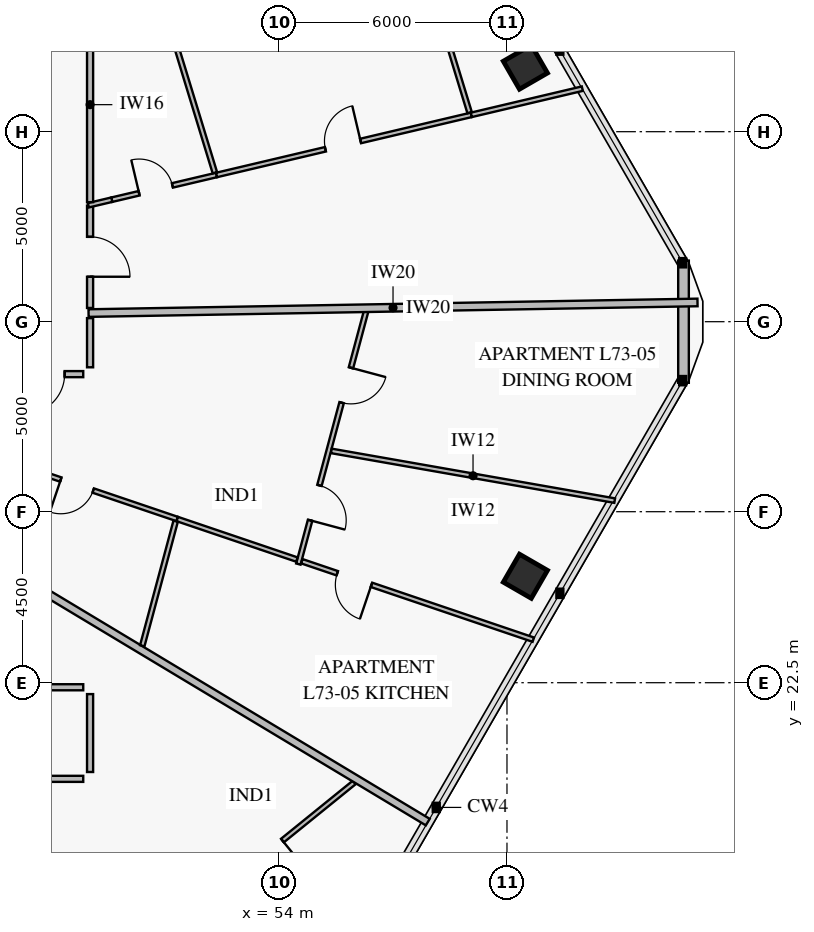
"""IFC4 building model, lengths in metres.
Left out: names, types, materials, properties, quantities, classifications, styles, units other than length and angle.
Written with IfcOpenShell. Run it as: python <this file> out.ifc"""

import sys

from ifc_helpers import new_model, si_unit, direction, frame, frame_2d, origin, origin_2d, place, context, subcontext, project, spatial, rectangle, extrude, element, fill, save


model = new_model("IFC4")
c1 = context("Model", 3, precision=1e-05, world=origin(), true_north=direction((0.0, 1.0)))
c2 = subcontext(c1, "Body", "Model", "MODEL_VIEW")
j1 = project(units=[si_unit("LENGTHUNIT", "METRE"), si_unit("PLANEANGLEUNIT", "RADIAN")], contexts=[c1])
p1 = place(None, origin())
s1 = spatial("IfcSite", under=j1, at=p1, CompositionType="ELEMENT")
p2 = place(p1, origin())
s2 = spatial("IfcBuilding", under=s1, at=p2, CompositionType="ELEMENT")
p3 = place(p2, frame((0.0, 0.0, 288.2)))
s3 = spatial("IfcBuildingStorey", under=s2, at=p3, CompositionType="ELEMENT", Elevation=288.2)
for number, where, z_axis, x_axis in (
    (1, (60.485, 38.699, 0.0), (0.0, 0.0, 1.0), (-0.5, 0.866, 0.0)),
    (2, (60.485, 25.301, 0.0), (0.0, 0.0, 1.0), (0.5, 0.866, 0.0)),
):
    element("IfcColumn", number, at=place(p3, frame(where, z_axis=z_axis, x_axis=x_axis)), inside=s3, PredefinedType="COLUMN", context=c2, shape_type="SweptSolid", body=[
        extrude(rectangle(XDim=0.85, YDim=0.85, at=origin_2d()), origin(), (0.0, 0.0, 1.0), 3.55),
    ])
p4 = place(p3, frame((64.645, 33.607, 0.0), z_axis=(0.0, 0.0, 1.0), x_axis=(0.0, -1.0, 0.0)))
e3 = element("IfcWall", 3, at=p4, inside=s3, PredefinedType="SOLIDWALL", context=c2, shape_type="SweptSolid", body=[
    extrude(rectangle(XDim=3.215, YDim=0.28, at=frame_2d((1.607, 0.0))), origin(), (0.0, 0.0, 1.0), 3.55),
])
p5 = place(p3, frame((47.542, 13.042, 0.0), z_axis=(0.0, 0.0, 1.0), x_axis=(0.777147459209, 0.629318541476, 0.0)))
e4 = element("IfcWall", 4, at=p5, inside=s3, PredefinedType="PARTITIONING", context=c2, shape_type="SweptSolid", body=[
    extrude(rectangle(XDim=10.857, YDim=0.12, at=frame_2d((5.428, 0.0))), origin(), (0.0, 0.0, 1.0), 2.95),
])
p6 = place(p5, frame((2.291, 0.0, 0.0)))
e5 = element("IfcOpeningElement", 5, at=p6, cuts=e4, PredefinedType="OPENING", context=c2, shape_type="SweptSolid", body=[
    extrude(rectangle(XDim=0.95, YDim=2.1, at=frame_2d((0.475, 1.05))), frame((0.0, 0.072, 0.0), z_axis=(0.0, -1.0, 0.0), x_axis=(1.0, 0.0, 0.0)), (0.0, 0.0, 1.0), 0.144),
])
p7 = place(p5, frame((7.479, 0.0, 0.0)))
e6 = element("IfcOpeningElement", 6, at=p7, cuts=e4, PredefinedType="OPENING", context=c2, shape_type="SweptSolid", body=[
    extrude(rectangle(XDim=0.95, YDim=2.1, at=frame_2d((0.475, 1.05))), frame((0.0, 0.072, 0.0), z_axis=(0.0, -1.0, 0.0), x_axis=(1.0, 0.0, 0.0)), (0.0, 0.0, 1.0), 0.144),
])
p8 = place(p3, frame((43.421, 19.97, 0.0), z_axis=(0.0, 0.0, 1.0), x_axis=(1.0, 0.0, 0.0)))
e7 = element("IfcWall", 7, at=p8, inside=s3, PredefinedType="PARTITIONING", context=c2, shape_type="SweptSolid", body=[
    extrude(rectangle(XDim=5.429, YDim=0.16, at=frame_2d((2.714, 0.0))), origin(), (0.0, 0.0, 1.0), 2.95),
])
p9 = place(p8, frame((2.189, 0.0, 0.0)))
e8 = element("IfcOpeningElement", 8, at=p9, cuts=e7, PredefinedType="OPENING", context=c2, shape_type="SweptSolid", body=[
    extrude(rectangle(XDim=1.05, YDim=2.15, at=frame_2d((0.525, 1.075))), frame((0.0, 0.092, 0.0), z_axis=(0.0, -1.0, 0.0), x_axis=(1.0, 0.0, 0.0)), (0.0, 0.0, 1.0), 0.184),
])
p10 = place(p3, frame((54.51, 25.622, 0.0), z_axis=(0.0, 0.0, 1.0), x_axis=(0.258833493947, 0.965921954617, 0.0)))
e9 = element("IfcWall", 9, at=p10, inside=s3, PredefinedType="PARTITIONING", context=c2, shape_type="SweptSolid", body=[
    extrude(rectangle(XDim=6.89, YDim=0.12, at=frame_2d((3.445, 0.0))), origin(), (0.0, 0.0, 1.0), 2.95),
])
p11 = place(p10, frame((1.193, 0.0, 0.0)))
e10 = element("IfcOpeningElement", 10, at=p11, cuts=e9, PredefinedType="OPENING", context=c2, shape_type="SweptSolid", body=[
    extrude(rectangle(XDim=0.95, YDim=2.1, at=frame_2d((0.475, 1.05))), frame((0.0, 0.072, 0.0), z_axis=(0.0, -1.0, 0.0), x_axis=(1.0, 0.0, 0.0)), (0.0, 0.0, 1.0), 0.144),
])
p12 = place(p10, frame((4.398, 0.0, 0.0)))
e11 = element("IfcOpeningElement", 11, at=p12, cuts=e9, PredefinedType="OPENING", context=c2, shape_type="SweptSolid", body=[
    extrude(rectangle(XDim=0.95, YDim=2.1, at=frame_2d((0.475, 1.05))), frame((0.0, 0.072, 0.0), z_axis=(0.0, -1.0, 0.0), x_axis=(1.0, 0.0, 0.0)), (0.0, 0.0, 1.0), 0.144),
])
p13 = place(p3, frame((46.808, 28.337, 0.0), z_axis=(0.0, 0.0, 1.0), x_axis=(0.947109682019, -0.320910034474, 0.0)))
e12 = element("IfcWall", 12, at=p13, inside=s3, PredefinedType="PARTITIONING", context=c2, shape_type="SweptSolid", body=[
    extrude(rectangle(XDim=4.767, YDim=0.12, at=frame_2d((2.384, 0.0))), origin(), (0.0, 0.0, 1.0), 3.55),
])
p14 = place(p13, frame((1.533, 0.0, 0.0)))
e13 = element("IfcOpeningElement", 13, at=p14, cuts=e12, PredefinedType="OPENING", context=c2, shape_type="SweptSolid", body=[
    extrude(rectangle(XDim=0.9, YDim=2.1, at=frame_2d((0.45, 1.05))), frame((0.0, 0.072, 0.0), z_axis=(0.0, -1.0, 0.0), x_axis=(1.0, 0.0, 0.0)), (0.0, 0.0, 1.0), 0.144),
])
p15 = place(p3, frame((51.323, 26.808, 0.0), z_axis=(0.0, 0.0, 1.0), x_axis=(0.947092742831, -0.320960023175, 0.0)))
e14 = element("IfcWall", 14, at=p15, inside=s3, PredefinedType="PARTITIONING", context=c2, shape_type="SweptSolid", body=[
    extrude(rectangle(XDim=3.325, YDim=0.12, at=frame_2d((1.663, 0.0))), origin(), (0.0, 0.0, 1.0), 3.15),
])
p16 = place(p3, frame((54.601, 25.697, 0.0), z_axis=(0.0, 0.0, 1.0), x_axis=(0.947084656941, -0.320983882128, 0.0)))
e15 = element("IfcWall", 15, at=p16, inside=s3, PredefinedType="PARTITIONING", context=c2, shape_type="SweptSolid", body=[
    extrude(rectangle(XDim=6.432, YDim=0.12, at=frame_2d((3.216, 0.0))), origin(), (0.0, 0.0, 1.0), 2.93),
])
p17 = place(p16, frame((0.985, 0.0, 0.0)))
e16 = element("IfcOpeningElement", 16, at=p17, cuts=e15, PredefinedType="OPENING", context=c2, shape_type="SweptSolid", body=[
    extrude(rectangle(XDim=0.95, YDim=2.1, at=frame_2d((0.475, 1.05))), frame((0.0, 0.072, 0.0), z_axis=(0.0, -1.0, 0.0), x_axis=(1.0, 0.0, 0.0)), (0.0, 0.0, 1.0), 0.144),
])
p18 = place(p3, frame((46.82, 30.62, 0.0), z_axis=(0.0, 0.0, 1.0), x_axis=(1.0, 0.0, 0.0)))
e17 = element("IfcWall", 17, at=p18, inside=s3, PredefinedType="PARTITIONING", context=c2, shape_type="SweptSolid", body=[
    extrude(rectangle(XDim=2.03, YDim=0.16, at=frame_2d((1.015, 0.0))), origin(), (0.0, 0.0, 1.0), 3.55),
])
p19 = place(p18, frame((0.49, 0.0, 0.0)))
e18 = element("IfcOpeningElement", 18, at=p19, cuts=e17, PredefinedType="OPENING", context=c2, shape_type="SweptSolid", body=[
    extrude(rectangle(XDim=1.05, YDim=2.15, at=frame_2d((0.525, 1.075))), frame((0.0, 0.092, 0.0), z_axis=(0.0, -1.0, 0.0), x_axis=(1.0, 0.0, 0.0)), (0.0, 0.0, 1.0), 0.184),
])
p20 = place(p3, frame((49.6, 35.21, 0.0), z_axis=(0.0, 0.0, 1.0), x_axis=(0.973261007636, 0.229702004812, 0.0)))
e19 = element("IfcWall", 19, at=p20, inside=s3, PredefinedType="PARTITIONING", context=c2, shape_type="SweptSolid", body=[
    extrude(rectangle(XDim=2.833, YDim=0.12, at=frame_2d((1.417, 0.0))), origin(), (0.0, 0.0, 1.0), 3.55),
])
p21 = place(p20, frame((0.74, 0.0, 0.0)))
e20 = element("IfcOpeningElement", 20, at=p21, cuts=e19, PredefinedType="OPENING", context=c2, shape_type="SweptSolid", body=[
    extrude(rectangle(XDim=0.9, YDim=2.1, at=frame_2d((0.45, 1.05))), frame((0.0, 0.072, 0.0), z_axis=(0.0, -1.0, 0.0), x_axis=(1.0, 0.0, 0.0)), (0.0, 0.0, 1.0), 0.144),
])
p22 = place(p3, frame((52.358, 35.861, 0.0), z_axis=(0.0, 0.0, 1.0), x_axis=(0.973258867779, 0.229711071324, 0.0)))
e21 = element("IfcWall", 21, at=p22, inside=s3, PredefinedType="PARTITIONING", context=c2, shape_type="SweptSolid", body=[
    extrude(rectangle(XDim=6.887, YDim=0.12, at=frame_2d((3.443, 0.0))), origin(), (0.0, 0.0, 1.0), 3.55),
])
p23 = place(p22, frame((2.944, 0.0, 0.0)))
e22 = element("IfcOpeningElement", 22, at=p23, cuts=e21, PredefinedType="OPENING", context=c2, shape_type="SweptSolid", body=[
    extrude(rectangle(XDim=0.95, YDim=2.1, at=frame_2d((0.475, 1.05))), frame((0.0, 0.072, 0.0), z_axis=(0.0, -1.0, 0.0), x_axis=(1.0, 0.0, 0.0)), (0.0, 0.0, 1.0), 0.144),
])
p24 = place(p3, frame((59.017, 37.502, 0.0), z_axis=(0.0, 0.0, 1.0), x_axis=(-0.292365927027, 0.956306522363, 0.0)))
e23 = element("IfcWall", 23, at=p24, inside=s3, PredefinedType="PARTITIONING", context=c2, shape_type="SweptSolid", body=[
    extrude(rectangle(XDim=8.122, YDim=0.12, at=frame_2d((4.061, 0.0))), origin(), (0.0, 0.0, 1.0), 2.93),
])
p25 = place(p24, frame((1.742, 0.0, 0.0)))
e24 = element("IfcOpeningElement", 24, at=p25, cuts=e23, PredefinedType="OPENING", context=c2, shape_type="SweptSolid", body=[
    extrude(rectangle(XDim=0.95, YDim=2.1, at=frame_2d((0.475, 1.05))), frame((0.0, 0.072, 0.0), z_axis=(0.0, -1.0, 0.0), x_axis=(1.0, 0.0, 0.0)), (0.0, 0.0, 1.0), 0.144),
])
p26 = place(p3, frame((49.03, 32.361, 0.0), z_axis=(0.0, 0.0, 1.0), x_axis=(0.0, 1.0, 0.0)))
e25 = element("IfcWall", 25, at=p26, inside=s3, PredefinedType="PARTITIONING", context=c2, shape_type="SweptSolid", body=[
    extrude(rectangle(XDim=2.694, YDim=0.16, at=frame_2d((1.347, 0.0))), origin(), (0.0, 0.0, 1.0), 3.55),
])
p27 = place(p26, frame((0.822, 0.0, 0.0)))
e26 = element("IfcOpeningElement", 26, at=p27, cuts=e25, PredefinedType="OPENING", context=c2, shape_type="SweptSolid", body=[
    extrude(rectangle(XDim=1.05, YDim=2.15, at=frame_2d((0.525, 1.075))), frame((0.0, 0.092, 0.0), z_axis=(0.0, -1.0, 0.0), x_axis=(1.0, 0.0, 0.0)), (0.0, 0.0, 1.0), 0.184),
])
p28 = place(p3, frame((46.808, 25.506, 0.0), z_axis=(0.0, 0.0, 1.0), x_axis=(0.85716526059, -0.515041470212, 0.0)))
e27 = element("IfcWall", 27, at=p28, inside=s3, PredefinedType="PARTITIONING", context=c2, shape_type="SweptSolid", body=[
    extrude(rectangle(XDim=12.958, YDim=0.2, at=frame_2d((6.479, 0.0))), origin(), (0.0, 0.0, 1.0), 2.93),
])
p29 = place(p3, frame((55.379, 28.6, 0.0), z_axis=(0.0, 0.0, 1.0), x_axis=(0.984955483735, -0.172808260973, 0.0)))
e28 = element("IfcWall", 28, at=p29, inside=s3, PredefinedType="PARTITIONING", context=c2, shape_type="SweptSolid", body=[
    extrude(rectangle(XDim=7.57, YDim=0.12, at=frame_2d((3.785, 0.0))), origin(), (0.0, 0.0, 1.0), 2.93),
])
p30 = place(p3, frame((50.403, 23.472, 0.0), z_axis=(0.0, 0.0, 1.0), x_axis=(0.25876844848, 0.965939382193, 0.0)))
e29 = element("IfcWall", 29, at=p30, inside=s3, PredefinedType="PARTITIONING", context=c2, shape_type="SweptSolid", body=[
    extrude(rectangle(XDim=3.394, YDim=0.12, at=frame_2d((1.697, 0.0))), origin(), (0.0, 0.0, 1.0), 3.55),
])
p31 = place(p3, frame((48.99, 32.227, 0.0), z_axis=(0.0, 0.0, 1.0), x_axis=(0.999847852854, 0.01744336962, 0.0)))
e30 = element("IfcWall", 30, at=p31, inside=s3, PredefinedType="PARTITIONING", context=c2, shape_type="SweptSolid", body=[
    extrude(rectangle(XDim=16.026, YDim=0.2, at=frame_2d((8.013, 0.0))), origin(), (0.0, 0.0, 1.0), 2.93),
])
p32 = place(p3, frame((48.986, 35.065, 0.0), z_axis=(0.0, 0.0, 1.0), x_axis=(0.973264818569, 0.229685857064, 0.0)))
e31 = element("IfcWall", 31, at=p32, inside=s3, PredefinedType="PARTITIONING", context=c2, shape_type="SweptSolid", body=[
    extrude(rectangle(XDim=0.631, YDim=0.12, at=frame_2d((0.316, 0.0))), origin(), (0.0, 0.0, 1.0), 3.55),
])
p33 = place(p3, frame((59.061, 37.443, 0.0), z_axis=(0.0, 0.0, 1.0), x_axis=(0.97326763554, 0.229673920178, 0.0)))
e32 = element("IfcWall", 32, at=p33, inside=s3, PredefinedType="PARTITIONING", context=c2, shape_type="SweptSolid", body=[
    extrude(rectangle(XDim=3.002, YDim=0.12, at=frame_2d((1.501, 0.0))), origin(), (0.0, 0.0, 1.0), 2.93),
])
p34 = place(p3, frame((52.314, 35.92, 0.0), z_axis=(0.0, 0.0, 1.0), x_axis=(-0.292348629737, 0.95631181039, 0.0)))
e33 = element("IfcWall", 33, at=p34, inside=s3, PredefinedType="PARTITIONING", context=c2, shape_type="SweptSolid", body=[
    extrude(rectangle(XDim=5.769, YDim=0.12, at=frame_2d((2.884, 0.0))), origin(), (0.0, 0.0, 1.0), 2.95),
])
p35 = place(p3, frame((49.03, 20.15, 0.0), z_axis=(0.0, 0.0, 1.0), x_axis=(0.0, 1.0, 0.0)))
e34 = element("IfcWall", 34, at=p35, inside=s3, PredefinedType="PARTITIONING", context=c2, shape_type="SweptSolid", body=[
    extrude(rectangle(XDim=2.05, YDim=0.16, at=frame_2d((1.025, 0.0))), origin(), (0.0, 0.0, 1.0), 3.55),
])
p36 = place(p3, frame((48.85, 22.38, 0.0), z_axis=(0.0, 0.0, 1.0), x_axis=(-1.0, 0.0, 0.0)))
e35 = element("IfcWall", 35, at=p36, inside=s3, PredefinedType="PARTITIONING", context=c2, shape_type="SweptSolid", body=[
    extrude(rectangle(XDim=2.03, YDim=0.16, at=frame_2d((1.015, 0.0))), origin(), (0.0, 0.0, 1.0), 3.55),
])
p37 = place(p3, frame((49.03, 30.8, 0.0), z_axis=(0.0, 0.0, 1.0), x_axis=(0.0, 1.0, 0.0)))
e36 = element("IfcWall", 36, at=p37, inside=s3, PredefinedType="PARTITIONING", context=c2, shape_type="SweptSolid", body=[
    extrude(rectangle(XDim=1.294, YDim=0.16, at=frame_2d((0.647, 0.0))), origin(), (0.0, 0.0, 1.0), 3.55),
])
p38 = place(p3, frame((49.03, 35.145, 0.0), z_axis=(0.0, 0.0, 1.0), x_axis=(0.0, 1.0, 0.0)))
e37 = element("IfcWall", 37, at=p38, inside=s3, PredefinedType="PARTITIONING", context=c2, shape_type="SweptSolid", body=[
    extrude(rectangle(XDim=5.132, YDim=0.16, at=frame_2d((2.566, 0.0))), origin(), (0.0, 0.0, 1.0), 2.95),
])
p39 = place(p7, frame((0.95, 0.0, 0.0), z_axis=(0.0, 0.0, 1.0), x_axis=(-1.0, 0.0, 0.0)))
e38 = element("IfcDoor", 38, at=p39, inside=s3, OperationType="SINGLE_SWING_LEFT", PredefinedType="DOOR", context=c2, shape_type="SweptSolid", body=[
    extrude(rectangle(XDim=0.95, YDim=2.1, at=frame_2d((0.475, 1.05))), frame((0.0, 0.025, 0.0), z_axis=(0.0, -1.0, 0.0), x_axis=(1.0, 0.0, 0.0)), (0.0, 0.0, 1.0), 0.05),
])
fill(e6, e38)
p40 = place(p11, frame((0.95, 0.0, 0.0), z_axis=(0.0, 0.0, 1.0), x_axis=(-1.0, 0.0, 0.0)))
e39 = element("IfcDoor", 39, at=p40, inside=s3, OperationType="SINGLE_SWING_RIGHT", PredefinedType="DOOR", context=c2, shape_type="SweptSolid", body=[
    extrude(rectangle(XDim=0.95, YDim=2.1, at=frame_2d((0.475, 1.05))), frame((0.0, 0.025, 0.0), z_axis=(0.0, -1.0, 0.0), x_axis=(1.0, 0.0, 0.0)), (0.0, 0.0, 1.0), 0.05),
])
fill(e10, e39)
p41 = place(p12, frame((0.95, 0.0, 0.0), z_axis=(0.0, 0.0, 1.0), x_axis=(-1.0, 0.0, 0.0)))
e40 = element("IfcDoor", 40, at=p41, inside=s3, OperationType="SINGLE_SWING_LEFT", PredefinedType="DOOR", context=c2, shape_type="SweptSolid", body=[
    extrude(rectangle(XDim=0.95, YDim=2.1, at=frame_2d((0.475, 1.05))), frame((0.0, 0.025, 0.0), z_axis=(0.0, -1.0, 0.0), x_axis=(1.0, 0.0, 0.0)), (0.0, 0.0, 1.0), 0.05),
])
fill(e11, e40)
p42 = place(p14, frame((0.9, 0.0, 0.0), z_axis=(0.0, 0.0, 1.0), x_axis=(-1.0, 0.0, 0.0)))
e41 = element("IfcDoor", 41, at=p42, inside=s3, OperationType="SINGLE_SWING_RIGHT", PredefinedType="DOOR", context=c2, shape_type="SweptSolid", body=[
    extrude(rectangle(XDim=0.9, YDim=2.1, at=frame_2d((0.45, 1.05))), frame((0.0, 0.025, 0.0), z_axis=(0.0, -1.0, 0.0), x_axis=(1.0, 0.0, 0.0)), (0.0, 0.0, 1.0), 0.05),
])
fill(e13, e41)
p43 = place(p17, frame((0.95, 0.0, 0.0), z_axis=(0.0, 0.0, 1.0), x_axis=(-1.0, 0.0, 0.0)))
e42 = element("IfcDoor", 42, at=p43, inside=s3, OperationType="SINGLE_SWING_LEFT", PredefinedType="DOOR", context=c2, shape_type="SweptSolid", body=[
    extrude(rectangle(XDim=0.95, YDim=2.1, at=frame_2d((0.475, 1.05))), frame((0.0, 0.025, 0.0), z_axis=(0.0, -1.0, 0.0), x_axis=(1.0, 0.0, 0.0)), (0.0, 0.0, 1.0), 0.05),
])
fill(e16, e42)
p44 = place(p19, frame((1.05, 0.0, 0.0), z_axis=(0.0, 0.0, 1.0), x_axis=(-1.0, 0.0, 0.0)))
e43 = element("IfcDoor", 43, at=p44, inside=s3, OperationType="SINGLE_SWING_RIGHT", PredefinedType="DOOR", context=c2, shape_type="SweptSolid", body=[
    extrude(rectangle(XDim=1.05, YDim=2.15, at=frame_2d((0.525, 1.075))), frame((0.0, 0.025, 0.0), z_axis=(0.0, -1.0, 0.0), x_axis=(1.0, 0.0, 0.0)), (0.0, 0.0, 1.0), 0.05),
])
fill(e18, e43)
p45 = place(p21, origin())
e44 = element("IfcDoor", 44, at=p45, inside=s3, OperationType="SINGLE_SWING_LEFT", PredefinedType="DOOR", context=c2, shape_type="SweptSolid", body=[
    extrude(rectangle(XDim=0.9, YDim=2.1, at=frame_2d((0.45, 1.05))), frame((0.0, 0.025, 0.0), z_axis=(0.0, -1.0, 0.0), x_axis=(1.0, 0.0, 0.0)), (0.0, 0.0, 1.0), 0.05),
])
fill(e20, e44)
p46 = place(p23, origin())
e45 = element("IfcDoor", 45, at=p46, inside=s3, OperationType="SINGLE_SWING_RIGHT", PredefinedType="DOOR", context=c2, shape_type="SweptSolid", body=[
    extrude(rectangle(XDim=0.95, YDim=2.1, at=frame_2d((0.475, 1.05))), frame((0.0, 0.025, 0.0), z_axis=(0.0, -1.0, 0.0), x_axis=(1.0, 0.0, 0.0)), (0.0, 0.0, 1.0), 0.05),
])
fill(e22, e45)
p47 = place(p27, frame((1.05, 0.0, 0.0), z_axis=(0.0, 0.0, 1.0), x_axis=(-1.0, 0.0, 0.0)))
e46 = element("IfcDoor", 46, at=p47, inside=s3, OperationType="SINGLE_SWING_RIGHT", PredefinedType="DOOR", context=c2, shape_type="SweptSolid", body=[
    extrude(rectangle(XDim=1.05, YDim=2.15, at=frame_2d((0.525, 1.075))), frame((0.0, 0.025, 0.0), z_axis=(0.0, -1.0, 0.0), x_axis=(1.0, 0.0, 0.0)), (0.0, 0.0, 1.0), 0.05),
])
fill(e26, e46)
save(model, sys.argv[1])
